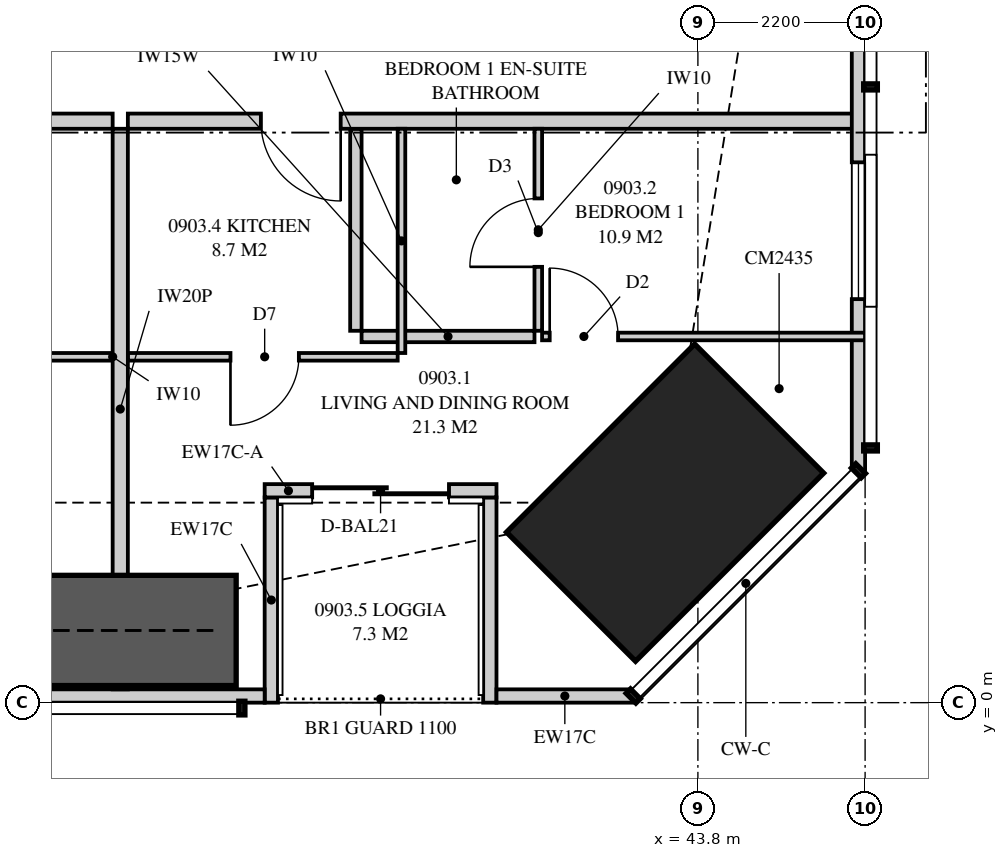
"""IFC4 building model, lengths in metres.
Left out: names, types, materials, properties, quantities, classifications, styles, units other than length and angle.
Written with IfcOpenShell. Run it as: python <this file> out.ifc"""

import sys

from ifc_helpers import new_model, si_unit, direction, frame, frame_2d, origin, origin_2d, place, context, subcontext, project, spatial, polyline, rectangle, outline, extrude, element, fill, save


model = new_model("IFC4")
c1 = context("Model", 3, precision=1e-05, world=origin(), true_north=direction((0.0, 1.0)))
c2 = subcontext(c1, "Body", "Model", "MODEL_VIEW")
j1 = project(units=[si_unit("LENGTHUNIT", "METRE"), si_unit("PLANEANGLEUNIT", "RADIAN")], contexts=[c1])
p1 = place(None, origin())
s1 = spatial("IfcSite", under=j1, at=p1, CompositionType="ELEMENT")
p2 = place(p1, origin())
s2 = spatial("IfcBuilding", under=s1, at=p2, CompositionType="ELEMENT")
p3 = place(p2, frame((0.0, 0.0, 37.75)))
s3 = spatial("IfcBuildingStorey", under=s2, at=p3, CompositionType="ELEMENT", Elevation=37.75)
p4 = place(p3, frame((43.369, 2.631, 0.0), z_axis=(0.0, 0.0, 1.0), x_axis=(-0.707106781187, 0.707106781187, 0.0)))
e1 = element("IfcColumn", 1, at=p4, inside=s3, PredefinedType="COLUMN", context=c2, shape_type="SweptSolid", body=[
    extrude(rectangle(XDim=2.4, YDim=3.5, at=origin_2d()), origin(), (0.0, 0.0, 1.0), 3.35),
])
p5 = place(p3, frame((30.025, 0.087, 0.0), z_axis=(0.0, 0.0, 1.0), x_axis=(1.0, 0.0, 0.0)))
e2 = element("IfcWall", 2, at=p5, inside=s3, PredefinedType="SOLIDWALL", context=c2, shape_type="SweptSolid", body=[
    extrude(outline(polyline([(0.0, 0.0), (8.075, 0.0), (8.075, 3.11), (5.179, 3.11), (5.179, 2.15), (5.131, 2.15), (5.131, 3.11), (4.975, 3.11), (4.975, 2.15), (0.0, 2.15), (0.0, 0.0)])), frame((0.0, 0.087, 0.0), z_axis=(0.0, -1.0, 0.0), x_axis=(1.0, 0.0, 0.0)), (0.0, 0.0, 1.0), 0.175),
])
p6 = place(p5, frame((0.857, 0.0, 0.4)))
e3 = element("IfcOpeningElement", 3, at=p6, cuts=e2, PredefinedType="OPENING", context=c2, shape_type="SweptSolid", body=[
    extrude(rectangle(XDim=1.2, YDim=1.7, at=frame_2d((0.6, 0.85))), frame((0.0, 0.097, 0.0), z_axis=(0.0, -1.0, 0.0), x_axis=(1.0, 0.0, 0.0)), (0.0, 0.0, 1.0), 0.195),
])
p7 = place(p3, frame((41.15, 0.087, 0.0), z_axis=(0.0, 0.0, 1.0), x_axis=(1.0, 0.0, 0.0)))
e4 = element("IfcWall", 4, at=p7, inside=s3, PredefinedType="SOLIDWALL", context=c2, shape_type="SweptSolid", body=[
    extrude(rectangle(XDim=1.799, YDim=0.175, at=frame_2d((0.899, 0.0))), origin(), (0.0, 0.0, 1.0), 3.11),
])
p8 = place(p3, frame((38.1, 2.788, 0.0), z_axis=(0.0, 0.0, 1.0), x_axis=(1.0, 0.0, 0.0)))
e5 = element("IfcWall", 5, at=p8, inside=s3, PredefinedType="SOLIDWALL", context=c2, shape_type="SweptSolid", body=[
    extrude(rectangle(XDim=0.625, YDim=0.175, at=frame_2d((0.312, 0.0))), origin(), (0.0, 0.0, 1.0), 2.51),
])
p9 = place(p3, frame((38.725, 2.788, 0.0), z_axis=(0.0, 0.0, 1.0), x_axis=(1.0, 0.0, 0.0)))
e6 = element("IfcWall", 6, at=p9, inside=s3, PredefinedType="SOLIDWALL", context=c2, shape_type="SweptSolid", body=[
    extrude(rectangle(XDim=2.425, YDim=0.175, at=frame_2d((1.212, 0.0))), origin(), (0.0, 0.0, 1.0), 2.15),
])
p10 = place(p9, origin())
e7 = element("IfcOpeningElement", 7, at=p10, cuts=e6, PredefinedType="OPENING", context=c2, shape_type="SweptSolid", body=[
    extrude(rectangle(XDim=1.8, YDim=2.1, at=frame_2d((0.9, 1.05))), frame((0.0, 0.097, 0.0), z_axis=(0.0, -1.0, 0.0), x_axis=(1.0, 0.0, 0.0)), (0.0, 0.0, 1.0), 0.195),
])
p11 = place(p3, frame((38.188, 0.0, 0.0), z_axis=(0.0, 0.0, 1.0), x_axis=(0.0, 1.0, 0.0)))
e8 = element("IfcWall", 8, at=p11, inside=s3, PredefinedType="SOLIDWALL", context=c2, shape_type="SweptSolid", body=[
    extrude(outline(polyline([(0.0, 0.0), (2.7, 0.0), (2.7, 2.51), (2.424, 2.51), (2.424, 2.15), (0.757, 2.15), (0.757, 3.11), (0.0, 3.11), (0.0, 0.0)])), frame((0.0, 0.087, 0.0), z_axis=(0.0, -1.0, 0.0), x_axis=(1.0, 0.0, 0.0)), (0.0, 0.0, 1.0), 0.175),
])
p12 = place(p3, frame((41.062, 0.0, 0.0), z_axis=(0.0, 0.0, 1.0), x_axis=(0.0, 1.0, 0.0)))
e9 = element("IfcWall", 9, at=p12, inside=s3, PredefinedType="SOLIDWALL", context=c2, shape_type="SweptSolid", body=[
    extrude(outline(polyline([(0.0, 0.0), (2.7, 0.0), (2.7, 2.15), (1.334, 2.15), (1.334, 3.11), (0.0, 3.11), (0.0, 0.0)])), frame((0.0, 0.087, 0.0), z_axis=(0.0, -1.0, 0.0), x_axis=(1.0, 0.0, 0.0)), (0.0, 0.0, 1.0), 0.175),
])
p13 = place(p3, frame((45.913, 3.051, 0.0), z_axis=(0.0, 0.0, 1.0), x_axis=(0.0, 1.0, 0.0)))
e10 = element("IfcWall", 10, at=p13, inside=s3, PredefinedType="SOLIDWALL", context=c2, shape_type="SweptSolid", body=[
    extrude(outline(polyline([(0.0, 0.0), (31.897, 0.0), (31.897, 3.11), (22.167, 3.11), (22.167, 2.15), (22.074, 2.15), (22.074, 3.11), (21.949, 3.11), (21.949, 2.15), (9.949, 2.15), (9.949, 3.11), (9.823, 3.11), (9.823, 2.15), (9.73, 2.15), (9.73, 3.11), (0.0, 3.11), (0.0, 0.0)])), frame((0.0, 0.087, 0.0), z_axis=(0.0, -1.0, 0.0), x_axis=(1.0, 0.0, 0.0)), (0.0, 0.0, 1.0), 0.175),
])
p14 = place(p13, frame((2.257, 0.0, 0.4)))
e11 = element("IfcOpeningElement", 11, at=p14, cuts=e10, PredefinedType="OPENING", context=c2, shape_type="SweptSolid", body=[
    extrude(rectangle(XDim=1.8, YDim=1.7, at=frame_2d((0.9, 0.85))), frame((0.0, 0.097, 0.0), z_axis=(0.0, -1.0, 0.0), x_axis=(1.0, 0.0, 0.0)), (0.0, 0.0, 1.0), 0.195),
])
p15 = place(p13, frame((14.849, 0.0, 0.4)))
e12 = element("IfcOpeningElement", 12, at=p15, cuts=e10, PredefinedType="OPENING", context=c2, shape_type="SweptSolid", body=[
    extrude(rectangle(XDim=1.2, YDim=1.7, at=frame_2d((0.6, 0.85))), frame((0.0, 0.097, 0.0), z_axis=(0.0, -1.0, 0.0), x_axis=(1.0, 0.0, 0.0)), (0.0, 0.0, 1.0), 0.195),
])
p16 = place(p13, frame((27.34, 0.0, 0.4)))
e13 = element("IfcOpeningElement", 13, at=p16, cuts=e10, PredefinedType="OPENING", context=c2, shape_type="SweptSolid", body=[
    extrude(rectangle(XDim=1.8, YDim=1.7, at=frame_2d((0.9, 0.85))), frame((0.0, 0.097, 0.0), z_axis=(0.0, -1.0, 0.0), x_axis=(1.0, 0.0, 0.0)), (0.0, 0.0, 1.0), 0.195),
])
p17 = place(p3, frame((36.2, 0.175, 0.0), z_axis=(0.0, 0.0, 1.0), x_axis=(0.0, 1.0, 0.0)))
e14 = element("IfcWall", 14, at=p17, inside=s3, PredefinedType="PARTITIONING", context=c2, shape_type="SweptSolid", body=[
    extrude(outline(polyline([(0.088, 3.11), (0.0, 3.11), (0.0, 0.0), (0.529, 0.0), (0.529, 0.677), (1.021, 0.677), (1.021, 0.0), (7.375, 0.0), (7.375, 3.11), (3.766, 3.11), (3.766, 2.51), (1.944, 2.51), (1.944, 2.15), (1.021, 2.15), (1.021, 1.473), (0.529, 1.473), (0.529, 2.15), (0.088, 2.15), (0.088, 3.11)])), frame((0.0, 0.1, 0.0), z_axis=(0.0, -1.0, 0.0), x_axis=(1.0, 0.0, 0.0)), (0.0, 0.0, 1.0), 0.2),
])
p18 = place(p3, frame((32.55, 4.55, 0.0), z_axis=(0.0, 0.0, 1.0), x_axis=(1.0, 0.0, 0.0)))
e15 = element("IfcWall", 15, at=p18, inside=s3, PredefinedType="PARTITIONING", context=c2, shape_type="SweptSolid", body=[
    extrude(outline(polyline([(0.0, 0.0), (3.55, 0.0), (3.55, 3.11), (2.737, 3.11), (2.737, 2.541), (2.163, 2.541), (2.163, 3.11), (0.0, 3.11), (0.0, 0.0)])), frame((0.0, 0.05, 0.0), z_axis=(0.0, -1.0, 0.0), x_axis=(1.0, 0.0, 0.0)), (0.0, 0.0, 1.0), 0.1),
])
p19 = place(p18, frame((1.3, 0.0, 0.0)))
e16 = element("IfcOpeningElement", 16, at=p19, cuts=e15, PredefinedType="OPENING", context=c2, shape_type="SweptSolid", body=[
    extrude(rectangle(XDim=0.9, YDim=2.1, at=frame_2d((0.45, 1.05))), frame((0.0, 0.06, 0.0), z_axis=(0.0, -1.0, 0.0), x_axis=(1.0, 0.0, 0.0)), (0.0, 0.0, 1.0), 0.12),
])
p20 = place(p3, frame((36.3, 7.65, 0.0), z_axis=(0.0, 0.0, 1.0), x_axis=(1.0, 0.0, 0.0)))
e17 = element("IfcWall", 17, at=p20, inside=s3, PredefinedType="PARTITIONING", context=c2, shape_type="SweptSolid", body=[
    extrude(outline(polyline([(0.0, 0.0), (9.7, 0.0), (9.7, 3.11), (8.804, 3.11), (8.804, 2.15), (6.96, 2.15), (6.96, 3.11), (0.0, 3.11), (0.0, 0.0)])), frame((0.0, 0.1, 0.0), z_axis=(0.0, -1.0, 0.0), x_axis=(1.0, 0.0, 0.0)), (0.0, 0.0, 1.0), 0.2),
])
p21 = place(p20, frame((1.75, 0.0, 0.0)))
e18 = element("IfcOpeningElement", 18, at=p21, cuts=e17, PredefinedType="OPENING", context=c2, shape_type="SweptSolid", body=[
    extrude(rectangle(XDim=1.05, YDim=2.2, at=frame_2d((0.525, 1.1))), frame((0.0, 0.11, 0.0), z_axis=(0.0, -1.0, 0.0), x_axis=(1.0, 0.0, 0.0)), (0.0, 0.0, 1.0), 0.22),
])
p22 = place(p3, frame((41.7, 4.892, 0.0), z_axis=(0.0, 0.0, 1.0), x_axis=(0.0, 1.0, 0.0)))
e19 = element("IfcWall", 19, at=p22, inside=s3, PredefinedType="PARTITIONING", context=c2, shape_type="SweptSolid", body=[
    extrude(rectangle(XDim=2.658, YDim=0.1, at=frame_2d((1.329, 0.0))), origin(), (0.0, 0.0, 1.0), 3.11),
])
p23 = place(p22, frame((0.841, 0.0, 0.0)))
e20 = element("IfcOpeningElement", 20, at=p23, cuts=e19, PredefinedType="OPENING", context=c2, shape_type="SweptSolid", body=[
    extrude(rectangle(XDim=0.9, YDim=2.1, at=frame_2d((0.45, 1.05))), frame((0.0, 0.06, 0.0), z_axis=(0.0, -1.0, 0.0), x_axis=(1.0, 0.0, 0.0)), (0.0, 0.0, 1.0), 0.12),
])
p24 = place(p3, frame((41.75, 4.817, 0.0), z_axis=(0.0, 0.0, 1.0), x_axis=(1.0, 0.0, 0.0)))
e21 = element("IfcWall", 21, at=p24, inside=s3, PredefinedType="PARTITIONING", context=c2, shape_type="SweptSolid", body=[
    extrude(outline(polyline([(0.0, 0.0), (4.25, 0.0), (4.25, 3.11), (2.844, 3.11), (2.844, 2.15), (1.102, 2.15), (1.102, 3.11), (0.0, 3.11), (0.0, 0.0)])), frame((0.0, 0.05, 0.0), z_axis=(0.0, -1.0, 0.0), x_axis=(1.0, 0.0, 0.0)), (0.0, 0.0, 1.0), 0.1),
])
p25 = place(p24, frame((0.1, 0.0, 0.0)))
e22 = element("IfcOpeningElement", 22, at=p25, cuts=e21, PredefinedType="OPENING", context=c2, shape_type="SweptSolid", body=[
    extrude(rectangle(XDim=0.9, YDim=2.1, at=frame_2d((0.45, 1.05))), frame((0.0, 0.06, 0.0), z_axis=(0.0, -1.0, 0.0), x_axis=(1.0, 0.0, 0.0)), (0.0, 0.0, 1.0), 0.12),
])
p26 = place(p3, frame((39.375, 4.817, 0.0), z_axis=(0.0, 0.0, 1.0), x_axis=(1.0, 0.0, 0.0)))
e23 = element("IfcWall", 23, at=p26, inside=s3, PredefinedType="PLUMBINGWALL", context=c2, shape_type="SweptSolid", body=[
    extrude(rectangle(XDim=2.275, YDim=0.15, at=frame_2d((1.137, 0.0))), origin(), (0.0, 0.0, 1.0), 3.11),
])
p27 = place(p3, frame((39.3, 4.892, 0.0), z_axis=(0.0, 0.0, 1.0), x_axis=(0.0, 1.0, 0.0)))
e24 = element("IfcWall", 24, at=p27, inside=s3, PredefinedType="PLUMBINGWALL", context=c2, shape_type="SweptSolid", body=[
    extrude(rectangle(XDim=2.658, YDim=0.15, at=frame_2d((1.329, 0.0))), origin(), (0.0, 0.0, 1.0), 3.11),
])
p28 = place(p3, frame((36.3, 4.55, 0.0), z_axis=(0.0, 0.0, 1.0), x_axis=(1.0, 0.0, 0.0)))
e25 = element("IfcWall", 25, at=p28, inside=s3, PredefinedType="PARTITIONING", context=c2, shape_type="SweptSolid", body=[
    extrude(rectangle(XDim=3.55, YDim=0.1, at=frame_2d((1.775, 0.0))), origin(), (0.0, 0.0, 1.0), 3.11),
])
p29 = place(p28, frame((1.35, 0.0, 0.0)))
e26 = element("IfcOpeningElement", 26, at=p29, cuts=e25, PredefinedType="OPENING", context=c2, shape_type="SweptSolid", body=[
    extrude(rectangle(XDim=0.9, YDim=2.1, at=frame_2d((0.45, 1.05))), frame((0.0, 0.06, 0.0), z_axis=(0.0, -1.0, 0.0), x_axis=(1.0, 0.0, 0.0)), (0.0, 0.0, 1.0), 0.12),
])
p30 = place(p3, frame((39.9, 4.6, 0.0), z_axis=(0.0, 0.0, 1.0), x_axis=(0.0, 1.0, 0.0)))
e27 = element("IfcWall", 27, at=p30, inside=s3, PredefinedType="PARTITIONING", context=c2, shape_type="SweptSolid", body=[
    extrude(rectangle(XDim=2.95, YDim=0.1, at=frame_2d((1.475, 0.0))), origin(), (0.0, 0.0, 1.0), 3.11),
])
p31 = place(p3, frame((30.675, 7.65, 0.0), z_axis=(0.0, 0.0, 1.0), x_axis=(1.0, 0.0, 0.0)))
e28 = element("IfcWall", 28, at=p31, inside=s3, PredefinedType="PARTITIONING", context=c2, shape_type="SweptSolid", body=[
    extrude(outline(polyline([(0.0, 0.0), (5.425, 0.0), (5.425, 3.11), (4.662, 3.11), (4.662, 2.541), (3.988, 2.541), (3.988, 3.11), (0.0, 3.11), (0.0, 0.0)])), frame((0.0, 0.1, 0.0), z_axis=(0.0, -1.0, 0.0), x_axis=(1.0, 0.0, 0.0)), (0.0, 0.0, 1.0), 0.2),
])
p32 = place(p3, frame((32.275, 0.95, 0.0), z_axis=(0.0, 0.0, 1.0), x_axis=(1.0, 0.0, 0.0)))
e29 = element("IfcWall", 29, at=p32, inside=s3, PredefinedType="SHEAR", context=c2, shape_type="SweptSolid", body=[
    extrude(rectangle(XDim=5.45, YDim=1.45, at=frame_2d((2.725, 0.0))), origin(), (0.0, 0.0, 1.0), 3.35),
])
p33 = place(p10, origin())
e30 = element("IfcDoor", 30, at=p33, inside=s3, OperationType="SLIDING_TO_LEFT", PredefinedType="DOOR", context=c2, shape_type="SweptSolid", body=[
    extrude(rectangle(XDim=1.8, YDim=2.1, at=frame_2d((0.9, 1.05))), frame((0.0, 0.025, 0.0), z_axis=(0.0, -1.0, 0.0), x_axis=(1.0, 0.0, 0.0)), (0.0, 0.0, 1.0), 0.05),
])
fill(e7, e30)
p34 = place(p14, origin())
e31 = element("IfcWindow", 31, at=p34, inside=s3, PartitioningType="SINGLE_PANEL", PredefinedType="WINDOW", context=c2, shape_type="SweptSolid", body=[
    extrude(rectangle(XDim=1.8, YDim=1.7, at=frame_2d((0.9, 0.85))), frame((0.0, 0.03, 0.0), z_axis=(0.0, -1.0, 0.0), x_axis=(1.0, 0.0, 0.0)), (0.0, 0.0, 1.0), 0.06),
])
fill(e11, e31)
p35 = place(p21, frame((1.05, 0.0, 0.0), z_axis=(0.0, 0.0, 1.0), x_axis=(-1.0, 0.0, 0.0)))
e32 = element("IfcDoor", 32, at=p35, inside=s3, OperationType="SINGLE_SWING_LEFT", PredefinedType="DOOR", context=c2, shape_type="SweptSolid", body=[
    extrude(rectangle(XDim=1.05, YDim=2.2, at=frame_2d((0.525, 1.1))), frame((0.0, 0.025, 0.0), z_axis=(0.0, -1.0, 0.0), x_axis=(1.0, 0.0, 0.0)), (0.0, 0.0, 1.0), 0.05),
])
fill(e18, e32)
p36 = place(p25, origin())
e33 = element("IfcDoor", 33, at=p36, inside=s3, OperationType="SINGLE_SWING_LEFT", PredefinedType="DOOR", context=c2, shape_type="SweptSolid", body=[
    extrude(rectangle(XDim=0.9, YDim=2.1, at=frame_2d((0.45, 1.05))), frame((0.0, 0.025, 0.0), z_axis=(0.0, -1.0, 0.0), x_axis=(1.0, 0.0, 0.0)), (0.0, 0.0, 1.0), 0.05),
])
fill(e22, e33)
p37 = place(p23, origin())
e34 = element("IfcDoor", 34, at=p37, inside=s3, OperationType="SINGLE_SWING_LEFT", PredefinedType="DOOR", context=c2, shape_type="SweptSolid", body=[
    extrude(rectangle(XDim=0.9, YDim=2.1, at=frame_2d((0.45, 1.05))), frame((0.0, 0.025, 0.0), z_axis=(0.0, -1.0, 0.0), x_axis=(1.0, 0.0, 0.0)), (0.0, 0.0, 1.0), 0.05),
])
fill(e20, e34)
p38 = place(p29, frame((0.9, 0.0, 0.0), z_axis=(0.0, 0.0, 1.0), x_axis=(-1.0, 0.0, 0.0)))
e35 = element("IfcDoor", 35, at=p38, inside=s3, OperationType="SINGLE_SWING_RIGHT", PredefinedType="DOOR", context=c2, shape_type="SweptSolid", body=[
    extrude(rectangle(XDim=0.9, YDim=2.1, at=frame_2d((0.45, 1.05))), frame((0.0, 0.025, 0.0), z_axis=(0.0, -1.0, 0.0), x_axis=(1.0, 0.0, 0.0)), (0.0, 0.0, 1.0), 0.05),
])
fill(e26, e35)
save(model, sys.argv[1])
